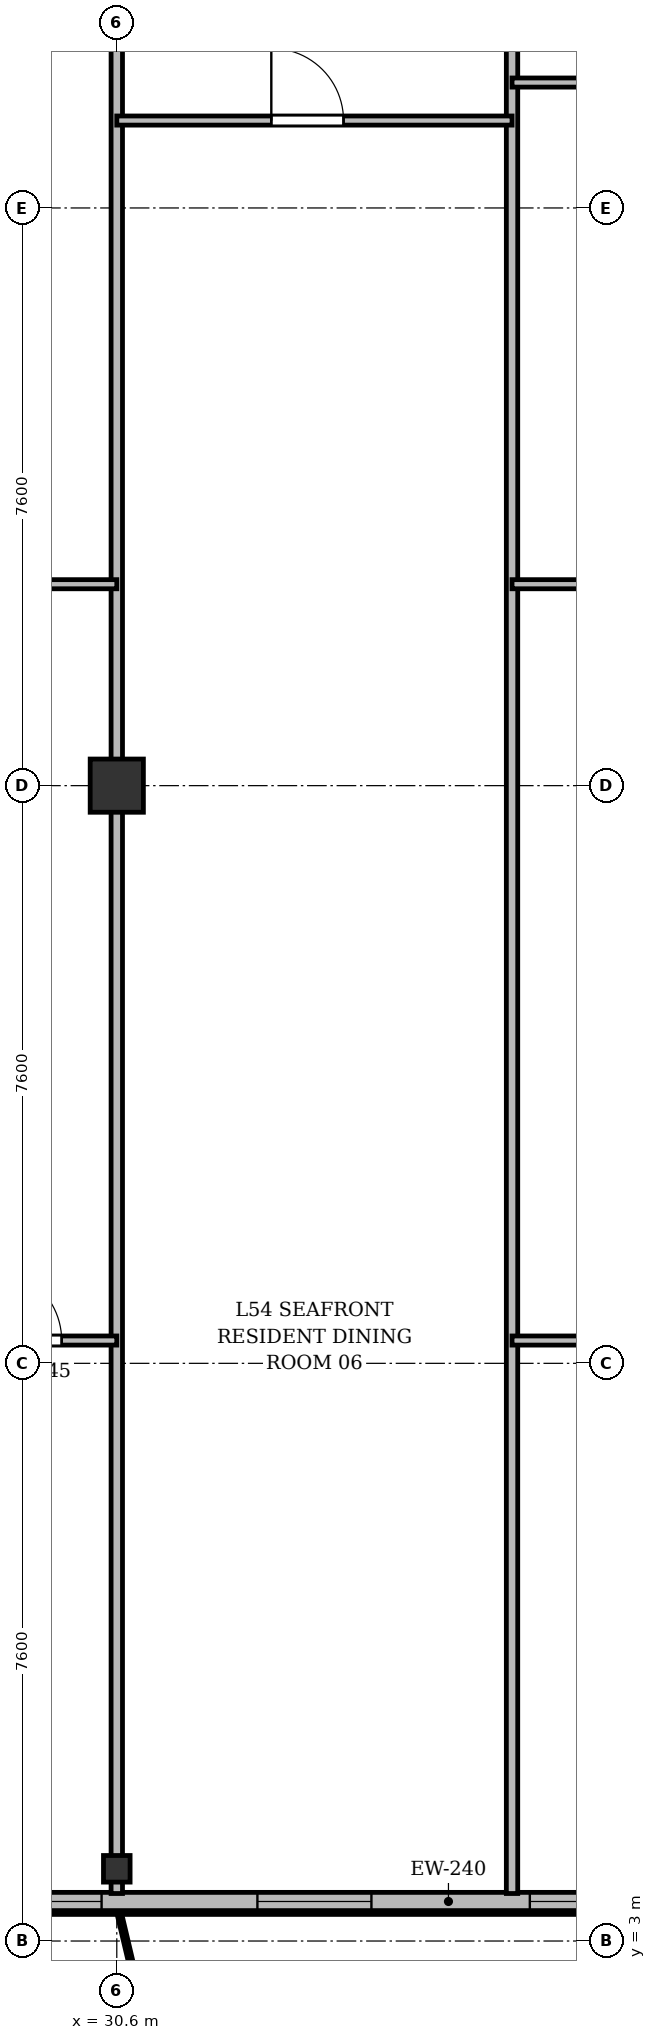
"""IFC4 building model, lengths in metres.
Left out: names, types, materials, properties, quantities, classifications, styles, units other than length and angle.
Written with IfcOpenShell. Run it as: python <this file> out.ifc"""

import sys

from ifc_helpers import new_model, si_unit, direction, frame, frame_2d, origin, origin_2d, place, context, subcontext, project, spatial, rectangle, i_section, extrude, source, transform, mapped, element, fill, save


model = new_model("IFC4")
c1 = context("Model", 3, precision=1e-05, world=origin(), true_north=direction((0.0, 1.0)))
c2 = subcontext(c1, "Body", "Model", "MODEL_VIEW")
j1 = project(units=[si_unit("LENGTHUNIT", "METRE"), si_unit("PLANEANGLEUNIT", "RADIAN")], contexts=[c1])
p1 = place(None, origin())
s1 = spatial("IfcSite", under=j1, at=p1, CompositionType="ELEMENT")
p2 = place(p1, origin())
s2 = spatial("IfcBuilding", under=s1, at=p2, CompositionType="ELEMENT")
p3 = place(p2, frame((0.0, 0.0, 208.5)))
s3 = spatial("IfcBuildingStorey", under=s2, at=p3, CompositionType="ELEMENT", Elevation=208.5)
m1 = source(origin(), c2, "Body", "SweptSolid", [
    extrude(i_section(OverallWidth=0.35, OverallDepth=0.35, WebThickness=0.018, FlangeThickness=0.028, at=origin_2d()), origin(), (0.0, 0.0, 1.0), 3.6),
])
p4 = place(p3, frame((30.6, 3.95, 0.0), z_axis=(0.0, 0.0, 1.0), x_axis=(1.0, 0.0, 0.0)))
e1 = element("IfcColumn", 1, at=p4, inside=s3, PredefinedType="COLUMN", context=c2, shape_type="MappedRepresentation", body=[
    mapped(m1, transform((0.0, 0.0, 0.0), x_axis=(1.0, 0.0, 0.0), y_axis=(0.0, 1.0, 0.0), z_axis=(0.0, 0.0, 1.0), scale=1.0)),
])
m2 = source(origin(), c2, "Body", "SweptSolid", [
    extrude(rectangle(XDim=0.7, YDim=0.7, at=origin_2d()), origin(), (0.0, 0.0, 1.0), 3.6),
])
p5 = place(p3, frame((30.6, 18.2, 0.0), z_axis=(0.0, 0.0, 1.0), x_axis=(1.0, 0.0, 0.0)))
e2 = element("IfcColumn", 2, at=p5, inside=s3, PredefinedType="COLUMN", context=c2, shape_type="MappedRepresentation", body=[
    mapped(m2, transform((0.0, 0.0, 0.0), x_axis=(1.0, 0.0, 0.0), y_axis=(0.0, 1.0, 0.0), z_axis=(0.0, 0.0, 1.0), scale=1.0)),
])
p6 = place(p3, frame((63.4, 3.52, 0.0), z_axis=(0.0, 0.0, 1.0), x_axis=(-1.0, 0.0, 0.0)))
e3 = element("IfcWall", 3, at=p6, inside=s3, PredefinedType="SOLIDWALL", context=c2, shape_type="SweptSolid", body=[
    extrude(rectangle(XDim=52.4, YDim=0.24, at=frame_2d((26.2, 0.0))), origin(), (0.0, 0.0, 1.0), 3.36),
])
p7 = place(p6, frame((1.52, 0.0, 0.9)))
e4 = element("IfcOpeningElement", 4, at=p7, cuts=e3, PredefinedType="OPENING", context=c2, shape_type="SweptSolid", body=[
    extrude(rectangle(XDim=1.65, YDim=1.85, at=frame_2d((0.825, 0.925))), frame((0.0, 0.13, 0.0), z_axis=(0.0, -1.0, 0.0), x_axis=(1.0, 0.0, 0.0)), (0.0, 0.0, 1.0), 0.26),
])
p8 = place(p6, frame((5.0, 0.0, 0.9)))
e5 = element("IfcOpeningElement", 5, at=p8, cuts=e3, PredefinedType="OPENING", context=c2, shape_type="SweptSolid", body=[
    extrude(rectangle(XDim=1.8, YDim=1.8, at=frame_2d((0.9, 0.9))), frame((0.0, 0.13, 0.0), z_axis=(0.0, -1.0, 0.0), x_axis=(1.0, 0.0, 0.0)), (0.0, 0.0, 1.0), 0.26),
])
p9 = place(p6, frame((7.45, 0.0, 0.9)))
e6 = element("IfcOpeningElement", 6, at=p9, cuts=e3, PredefinedType="OPENING", context=c2, shape_type="SweptSolid", body=[
    extrude(rectangle(XDim=1.5, YDim=1.75, at=frame_2d((0.75, 0.875))), frame((0.0, 0.13, 0.0), z_axis=(0.0, -1.0, 0.0), x_axis=(1.0, 0.0, 0.0)), (0.0, 0.0, 1.0), 0.26),
])
p10 = place(p6, frame((10.05, 0.0, 0.9)))
e7 = element("IfcOpeningElement", 7, at=p10, cuts=e3, PredefinedType="OPENING", context=c2, shape_type="SweptSolid", body=[
    extrude(rectangle(XDim=1.5, YDim=1.75, at=frame_2d((0.75, 0.875))), frame((0.0, 0.13, 0.0), z_axis=(0.0, -1.0, 0.0), x_axis=(1.0, 0.0, 0.0)), (0.0, 0.0, 1.0), 0.26),
])
p11 = place(p6, frame((14.217, 0.0, 0.0)))
e8 = element("IfcOpeningElement", 8, at=p11, cuts=e3, PredefinedType="OPENING", context=c2, shape_type="SweptSolid", body=[
    extrude(rectangle(XDim=1.2, YDim=2.2, at=frame_2d((0.6, 1.1))), frame((0.0, 0.13, 0.0), z_axis=(0.0, -1.0, 0.0), x_axis=(1.0, 0.0, 0.0)), (0.0, 0.0, 1.0), 0.26),
])
p12 = place(p6, frame((20.108, 0.0, 0.9)))
e9 = element("IfcOpeningElement", 9, at=p12, cuts=e3, PredefinedType="OPENING", context=c2, shape_type="SweptSolid", body=[
    extrude(rectangle(XDim=1.65, YDim=1.85, at=frame_2d((0.825, 0.925))), frame((0.0, 0.13, 0.0), z_axis=(0.0, -1.0, 0.0), x_axis=(1.0, 0.0, 0.0)), (0.0, 0.0, 1.0), 0.26),
])
p13 = place(p6, frame((22.7, 0.0, 0.9)))
e10 = element("IfcOpeningElement", 10, at=p13, cuts=e3, PredefinedType="OPENING", context=c2, shape_type="SweptSolid", body=[
    extrude(rectangle(XDim=1.8, YDim=1.8, at=frame_2d((0.9, 0.9))), frame((0.0, 0.13, 0.0), z_axis=(0.0, -1.0, 0.0), x_axis=(1.0, 0.0, 0.0)), (0.0, 0.0, 1.0), 0.26),
])
p14 = place(p6, frame((25.166, 0.0, 0.9)))
e11 = element("IfcOpeningElement", 11, at=p14, cuts=e3, PredefinedType="OPENING", context=c2, shape_type="SweptSolid", body=[
    extrude(rectangle(XDim=2.2, YDim=1.8, at=frame_2d((1.1, 0.9))), frame((0.0, 0.13, 0.0), z_axis=(0.0, -1.0, 0.0), x_axis=(1.0, 0.0, 0.0)), (0.0, 0.0, 1.0), 0.26),
])
p15 = place(p6, frame((29.45, 0.0, 0.9)))
e12 = element("IfcOpeningElement", 12, at=p15, cuts=e3, PredefinedType="OPENING", context=c2, shape_type="SweptSolid", body=[
    extrude(rectangle(XDim=1.5, YDim=1.75, at=frame_2d((0.75, 0.875))), frame((0.0, 0.13, 0.0), z_axis=(0.0, -1.0, 0.0), x_axis=(1.0, 0.0, 0.0)), (0.0, 0.0, 1.0), 0.26),
])
p16 = place(p6, frame((33.0, 0.0, 0.9)))
e13 = element("IfcOpeningElement", 13, at=p16, cuts=e3, PredefinedType="OPENING", context=c2, shape_type="SweptSolid", body=[
    extrude(rectangle(XDim=2.0, YDim=1.95, at=frame_2d((1.0, 0.975))), frame((0.0, 0.13, 0.0), z_axis=(0.0, -1.0, 0.0), x_axis=(1.0, 0.0, 0.0)), (0.0, 0.0, 1.0), 0.26),
])
p17 = place(p6, frame((35.575, 0.0, 0.9)))
e14 = element("IfcOpeningElement", 14, at=p17, cuts=e3, PredefinedType="OPENING", context=c2, shape_type="SweptSolid", body=[
    extrude(rectangle(XDim=1.65, YDim=1.85, at=frame_2d((0.825, 0.925))), frame((0.0, 0.13, 0.0), z_axis=(0.0, -1.0, 0.0), x_axis=(1.0, 0.0, 0.0)), (0.0, 0.0, 1.0), 0.26),
])
p18 = place(p6, frame((37.9, 0.0, 0.9)))
e15 = element("IfcOpeningElement", 15, at=p18, cuts=e3, PredefinedType="OPENING", context=c2, shape_type="SweptSolid", body=[
    extrude(rectangle(XDim=1.8, YDim=1.8, at=frame_2d((0.9, 0.9))), frame((0.0, 0.13, 0.0), z_axis=(0.0, -1.0, 0.0), x_axis=(1.0, 0.0, 0.0)), (0.0, 0.0, 1.0), 0.26),
])
p19 = place(p6, frame((41.456, 0.0, 0.0)))
e16 = element("IfcOpeningElement", 16, at=p19, cuts=e3, PredefinedType="OPENING", context=c2, shape_type="SweptSolid", body=[
    extrude(rectangle(XDim=1.2, YDim=2.2, at=frame_2d((0.6, 1.1))), frame((0.0, 0.13, 0.0), z_axis=(0.0, -1.0, 0.0), x_axis=(1.0, 0.0, 0.0)), (0.0, 0.0, 1.0), 0.26),
])
p20 = place(p6, frame((43.45, 0.0, 0.9)))
e17 = element("IfcOpeningElement", 17, at=p20, cuts=e3, PredefinedType="OPENING", context=c2, shape_type="SweptSolid", body=[
    extrude(rectangle(XDim=1.5, YDim=1.75, at=frame_2d((0.75, 0.875))), frame((0.0, 0.13, 0.0), z_axis=(0.0, -1.0, 0.0), x_axis=(1.0, 0.0, 0.0)), (0.0, 0.0, 1.0), 0.26),
])
p21 = place(p6, frame((45.5, 0.0, 0.9)))
e18 = element("IfcOpeningElement", 18, at=p21, cuts=e3, PredefinedType="OPENING", context=c2, shape_type="SweptSolid", body=[
    extrude(rectangle(XDim=2.0, YDim=1.95, at=frame_2d((1.0, 0.975))), frame((0.0, 0.13, 0.0), z_axis=(0.0, -1.0, 0.0), x_axis=(1.0, 0.0, 0.0)), (0.0, 0.0, 1.0), 0.26),
])
p22 = place(p6, frame((49.23, 0.0, 0.9)))
e19 = element("IfcOpeningElement", 19, at=p22, cuts=e3, PredefinedType="OPENING", context=c2, shape_type="SweptSolid", body=[
    extrude(rectangle(XDim=1.65, YDim=1.85, at=frame_2d((0.825, 0.925))), frame((0.0, 0.13, 0.0), z_axis=(0.0, -1.0, 0.0), x_axis=(1.0, 0.0, 0.0)), (0.0, 0.0, 1.0), 0.26),
])
p23 = place(p3, frame((30.6, 3.625, 0.0), z_axis=(0.0, 0.0, 1.0), x_axis=(0.0, 1.0, 0.0)))
e20 = element("IfcWall", 20, at=p23, inside=s3, PredefinedType="PARTITIONING", context=c2, shape_type="SweptSolid", body=[
    extrude(rectangle(XDim=27.175, YDim=0.15, at=frame_2d((13.587, 0.0))), origin(), (0.0, 0.0, 1.0), 2.86),
])
p24 = place(p3, frame((35.8, 3.625, 0.0), z_axis=(0.0, 0.0, 1.0), x_axis=(0.0, 1.0, 0.0)))
e21 = element("IfcWall", 21, at=p24, inside=s3, PredefinedType="PARTITIONING", context=c2, shape_type="SweptSolid", body=[
    extrude(rectangle(XDim=27.175, YDim=0.15, at=frame_2d((13.587, 0.0))), origin(), (0.0, 0.0, 1.0), 2.91),
])
p25 = place(p3, frame((23.4, 20.85, 0.0), z_axis=(0.0, 0.0, 1.0), x_axis=(1.0, 0.0, 0.0)))
e22 = element("IfcWall", 22, at=p25, inside=s3, PredefinedType="PARTITIONING", context=c2, shape_type="SweptSolid", body=[
    extrude(rectangle(XDim=7.2, YDim=0.12, at=frame_2d((3.6, 0.0))), origin(), (0.0, 0.0, 1.0), 2.86),
])
p26 = place(p25, frame((3.125, 0.0, 0.0)))
e23 = element("IfcOpeningElement", 23, at=p26, cuts=e22, PredefinedType="OPENING", context=c2, shape_type="SweptSolid", body=[
    extrude(rectangle(XDim=0.95, YDim=2.15, at=frame_2d((0.475, 1.075))), frame((0.0, 0.07, 0.0), z_axis=(0.0, -1.0, 0.0), x_axis=(1.0, 0.0, 0.0)), (0.0, 0.0, 1.0), 0.14),
])
p27 = place(p3, frame((28.2, 10.9, 0.0), z_axis=(0.0, 0.0, 1.0), x_axis=(1.0, 0.0, 0.0)))
e24 = element("IfcWall", 24, at=p27, inside=s3, PredefinedType="PARTITIONING", context=c2, shape_type="SweptSolid", body=[
    extrude(rectangle(XDim=2.4, YDim=0.12, at=frame_2d((1.2, 0.0))), origin(), (0.0, 0.0, 1.0), 2.86),
])
p28 = place(p27, frame((0.725, 0.0, 0.0)))
e25 = element("IfcOpeningElement", 25, at=p28, cuts=e24, PredefinedType="OPENING", context=c2, shape_type="SweptSolid", body=[
    extrude(rectangle(XDim=0.95, YDim=2.15, at=frame_2d((0.475, 1.075))), frame((0.0, 0.07, 0.0), z_axis=(0.0, -1.0, 0.0), x_axis=(1.0, 0.0, 0.0)), (0.0, 0.0, 1.0), 0.14),
])
p29 = place(p3, frame((30.6, 26.95, 0.0), z_axis=(0.0, 0.0, 1.0), x_axis=(1.0, 0.0, 0.0)))
e26 = element("IfcWall", 26, at=p29, inside=s3, PredefinedType="PARTITIONING", context=c2, shape_type="SweptSolid", body=[
    extrude(rectangle(XDim=5.2, YDim=0.12, at=frame_2d((2.6, 0.0))), origin(), (0.0, 0.0, 1.0), 2.86),
])
p30 = place(p29, frame((2.033, 0.0, 0.0)))
e27 = element("IfcOpeningElement", 27, at=p30, cuts=e26, PredefinedType="OPENING", context=c2, shape_type="SweptSolid", body=[
    extrude(rectangle(XDim=0.95, YDim=2.15, at=frame_2d((0.475, 1.075))), frame((0.0, 0.07, 0.0), z_axis=(0.0, -1.0, 0.0), x_axis=(1.0, 0.0, 0.0)), (0.0, 0.0, 1.0), 0.14),
])
p31 = place(p3, frame((35.8, 20.85, 0.0), z_axis=(0.0, 0.0, 1.0), x_axis=(1.0, 0.0, 0.0)))
e28 = element("IfcWall", 28, at=p31, inside=s3, PredefinedType="PARTITIONING", context=c2, shape_type="SweptSolid", body=[
    extrude(rectangle(XDim=8.0, YDim=0.12, at=frame_2d((4.0, 0.0))), origin(), (0.0, 0.0, 1.0), 2.86),
])
p32 = place(p31, frame((3.525, 0.0, 0.0)))
e29 = element("IfcOpeningElement", 29, at=p32, cuts=e28, PredefinedType="OPENING", context=c2, shape_type="SweptSolid", body=[
    extrude(rectangle(XDim=0.95, YDim=2.15, at=frame_2d((0.475, 1.075))), frame((0.0, 0.07, 0.0), z_axis=(0.0, -1.0, 0.0), x_axis=(1.0, 0.0, 0.0)), (0.0, 0.0, 1.0), 0.14),
])
p33 = place(p3, frame((35.8, 27.45, 0.0), z_axis=(0.0, 0.0, 1.0), x_axis=(1.0, 0.0, 0.0)))
e30 = element("IfcWall", 30, at=p33, inside=s3, PredefinedType="PARTITIONING", context=c2, shape_type="SweptSolid", body=[
    extrude(rectangle(XDim=2.4, YDim=0.12, at=frame_2d((1.2, 0.0))), origin(), (0.0, 0.0, 1.0), 3.36),
])
p34 = place(p3, frame((35.8, 10.9, 0.0), z_axis=(0.0, 0.0, 1.0), x_axis=(1.0, 0.0, 0.0)))
e31 = element("IfcWall", 31, at=p34, inside=s3, PredefinedType="PARTITIONING", context=c2, shape_type="SweptSolid", body=[
    extrude(rectangle(XDim=2.667, YDim=0.12, at=frame_2d((1.333, 0.0))), origin(), (0.0, 0.0, 1.0), 3.36),
])
p35 = place(p34, frame((0.859, 0.0, 0.0)))
e32 = element("IfcOpeningElement", 32, at=p35, cuts=e31, PredefinedType="OPENING", context=c2, shape_type="SweptSolid", body=[
    extrude(rectangle(XDim=0.95, YDim=2.15, at=frame_2d((0.475, 1.075))), frame((0.0, 0.07, 0.0), z_axis=(0.0, -1.0, 0.0), x_axis=(1.0, 0.0, 0.0)), (0.0, 0.0, 1.0), 0.14),
])
m3 = source(origin(), c2, "Body", "SweptSolid", [
    extrude(rectangle(XDim=2.2, YDim=1.8, at=frame_2d((1.1, 0.9))), frame((0.0, 0.03, 0.0), z_axis=(0.0, -1.0, 0.0), x_axis=(1.0, 0.0, 0.0)), (0.0, 0.0, 1.0), 0.06),
])
p36 = place(p14, origin())
e33 = element("IfcWindow", 33, at=p36, inside=s3, PartitioningType="SINGLE_PANEL", PredefinedType="WINDOW", context=c2, shape_type="MappedRepresentation", body=[
    mapped(m3, transform((0.0, 0.0, 0.0), x_axis=(1.0, 0.0, 0.0), y_axis=(0.0, 1.0, 0.0), z_axis=(0.0, 0.0, 1.0), scale=1.0)),
])
fill(e11, e33)
m4 = source(origin(), c2, "Body", "SweptSolid", [
    extrude(rectangle(XDim=1.5, YDim=1.75, at=frame_2d((0.75, 0.875))), frame((0.0, 0.03, 0.0), z_axis=(0.0, -1.0, 0.0), x_axis=(1.0, 0.0, 0.0)), (0.0, 0.0, 1.0), 0.06),
])
p37 = place(p15, origin())
e34 = element("IfcWindow", 34, at=p37, inside=s3, PartitioningType="SINGLE_PANEL", PredefinedType="WINDOW", context=c2, shape_type="MappedRepresentation", body=[
    mapped(m4, transform((0.0, 0.0, 0.0), x_axis=(1.0, 0.0, 0.0), y_axis=(0.0, 1.0, 0.0), z_axis=(0.0, 0.0, 1.0), scale=1.0)),
])
fill(e12, e34)
m5 = source(origin(), c2, "Body", "SweptSolid", [
    extrude(rectangle(XDim=2.0, YDim=1.95, at=frame_2d((1.0, 0.975))), frame((0.0, 0.03, 0.0), z_axis=(0.0, -1.0, 0.0), x_axis=(1.0, 0.0, 0.0)), (0.0, 0.0, 1.0), 0.06),
])
p38 = place(p16, origin())
e35 = element("IfcWindow", 35, at=p38, inside=s3, PartitioningType="SINGLE_PANEL", PredefinedType="WINDOW", context=c2, shape_type="MappedRepresentation", body=[
    mapped(m5, transform((0.0, 0.0, 0.0), x_axis=(1.0, 0.0, 0.0), y_axis=(0.0, 1.0, 0.0), z_axis=(0.0, 0.0, 1.0), scale=1.0)),
])
fill(e13, e35)
m6 = source(origin(), c2, "Body", "SweptSolid", [
    extrude(rectangle(XDim=0.95, YDim=2.15, at=frame_2d((0.475, 1.075))), frame((0.0, 0.025, 0.0), z_axis=(0.0, -1.0, 0.0), x_axis=(1.0, 0.0, 0.0)), (0.0, 0.0, 1.0), 0.05),
])
p39 = place(p28, origin())
e36 = element("IfcDoor", 36, at=p39, inside=s3, OperationType="SINGLE_SWING_LEFT", PredefinedType="DOOR", context=c2, shape_type="MappedRepresentation", body=[
    mapped(m6, transform((0.0, 0.0, 0.0), x_axis=(1.0, 0.0, 0.0), y_axis=(0.0, 1.0, 0.0), z_axis=(0.0, 0.0, 1.0), scale=1.0)),
])
fill(e25, e36)
p40 = place(p30, origin())
e37 = element("IfcDoor", 37, at=p40, inside=s3, OperationType="SINGLE_SWING_LEFT", PredefinedType="DOOR", context=c2, shape_type="MappedRepresentation", body=[
    mapped(m6, transform((0.0, 0.0, 0.0), x_axis=(1.0, 0.0, 0.0), y_axis=(0.0, 1.0, 0.0), z_axis=(0.0, 0.0, 1.0), scale=1.0)),
])
fill(e27, e37)
save(model, sys.argv[1])
